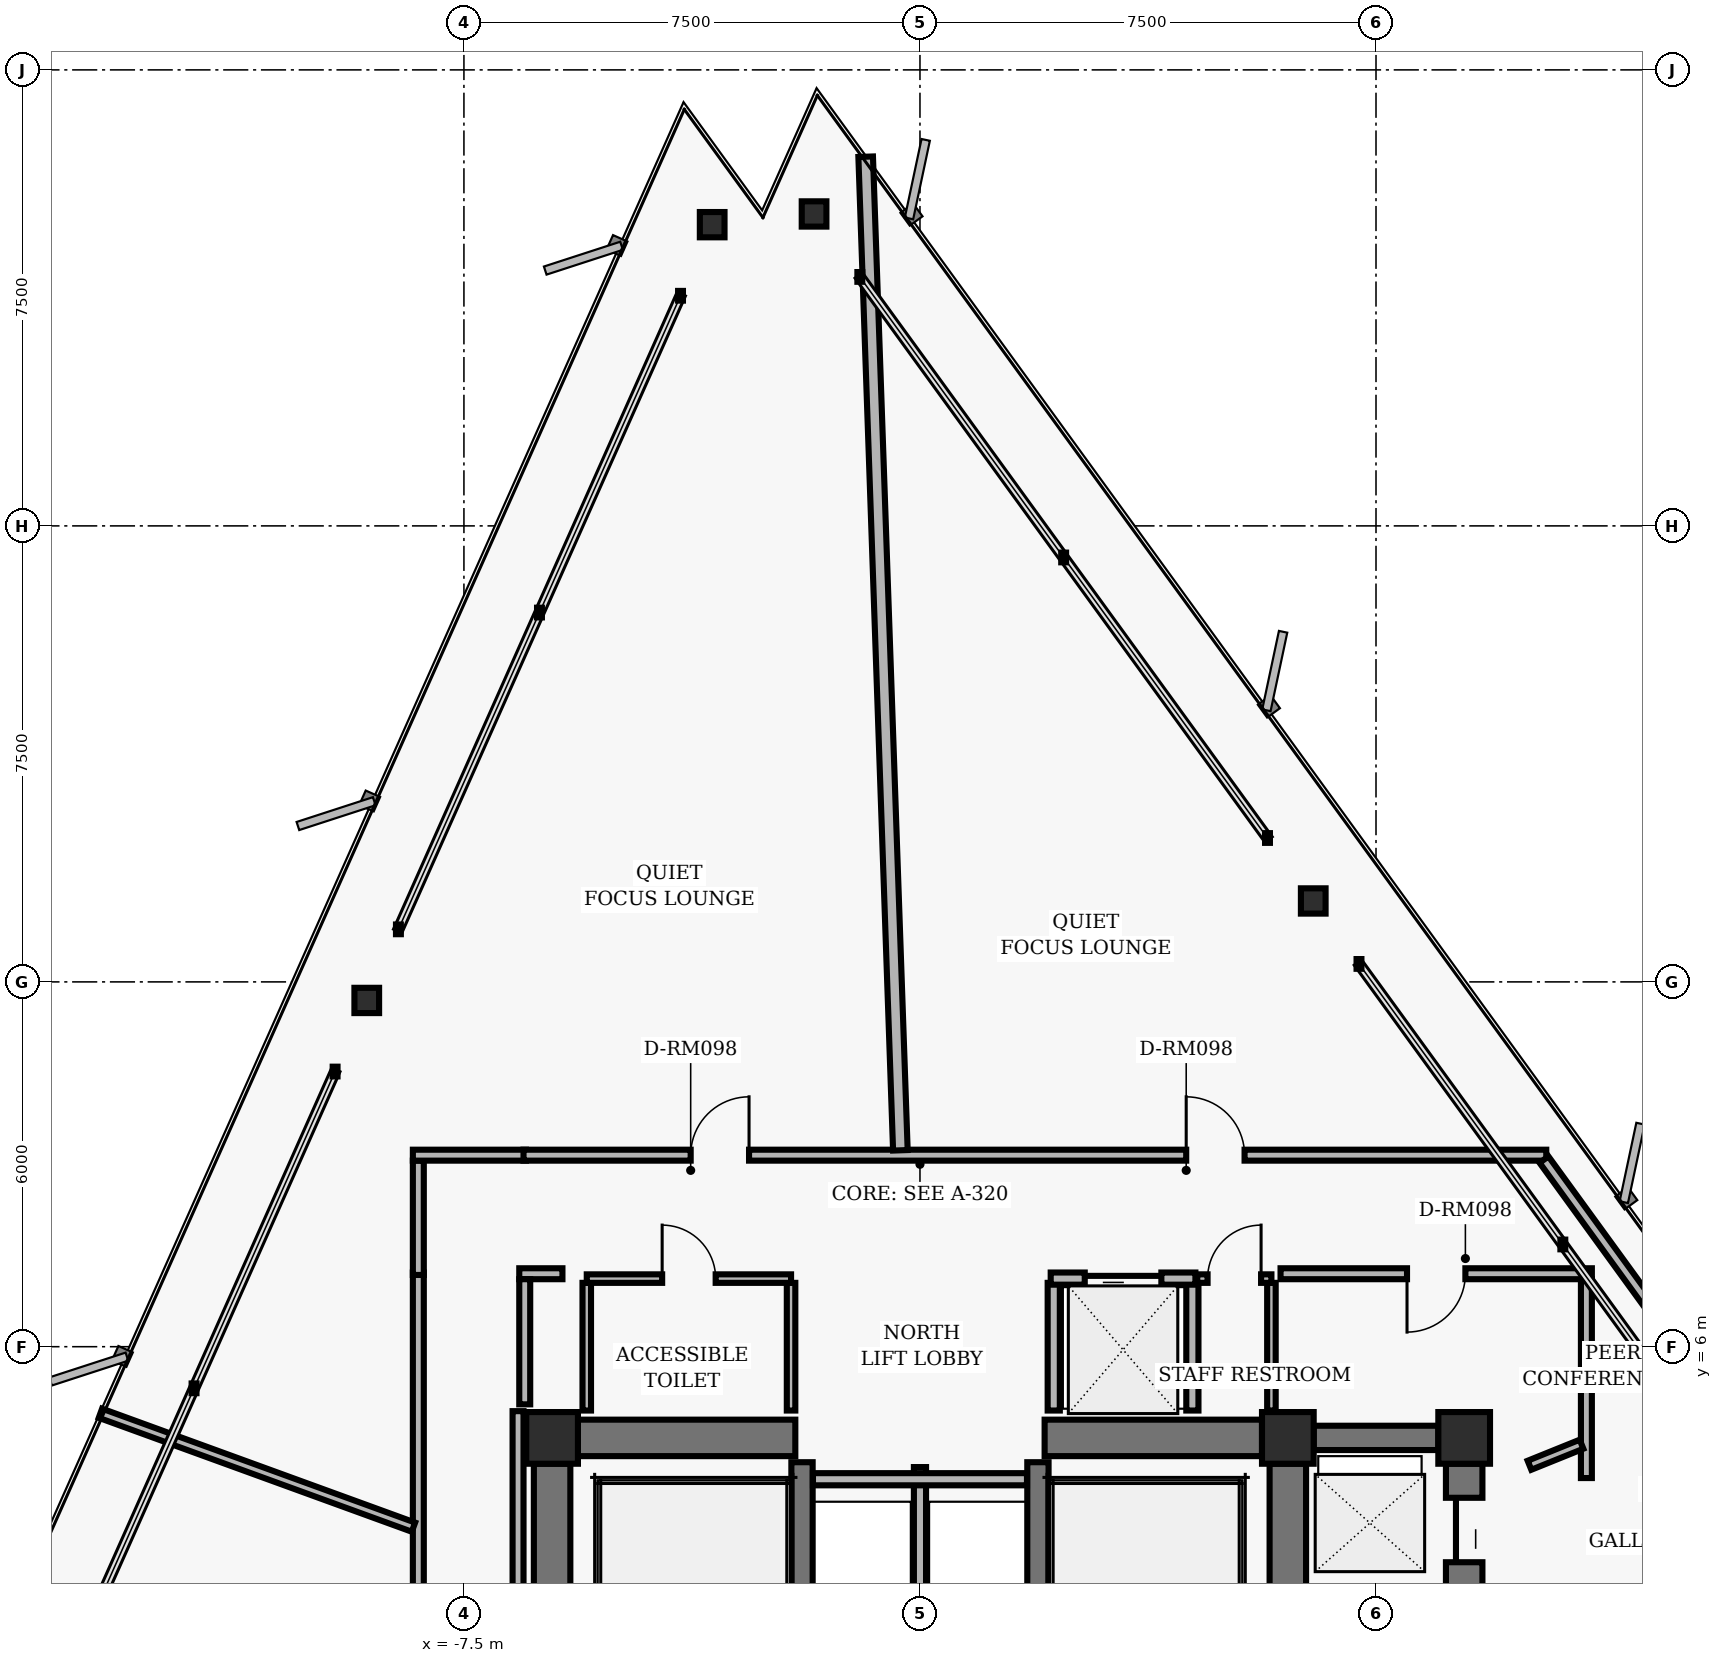
"""IFC4 building model, lengths in metres.
Left out: names, types, materials, properties, quantities, classifications, styles, units other than length and angle.
Written with IfcOpenShell. Run it as: python <this file> out.ifc"""

import sys

from ifc_helpers import new_model, si_unit, direction, frame, frame_2d, origin, origin_2d, place, context, subcontext, project, spatial, rectangle, hollow_rectangle, i_section, extrude, element, fill, save


model = new_model("IFC4")
c1 = context("Model", 3, precision=1e-05, world=origin(), true_north=direction((0.0, 1.0)))
c2 = subcontext(c1, "Body", "Model", "MODEL_VIEW")
j1 = project(units=[si_unit("LENGTHUNIT", "METRE"), si_unit("PLANEANGLEUNIT", "RADIAN")], contexts=[c1])
p1 = place(None, origin())
s1 = spatial("IfcSite", under=j1, at=p1, CompositionType="ELEMENT")
p2 = place(p1, origin())
s2 = spatial("IfcBuilding", under=s1, at=p2, CompositionType="ELEMENT")
p3 = place(p2, frame((0.0, 0.0, 122.88)))
s3 = spatial("IfcBuildingStorey", under=s2, at=p3, CompositionType="ELEMENT", Elevation=122.88)
for number, where, z_axis, x_axis in (
    (1, (-6.05, 4.5, 0.0), (0.0, 0.0, 1.0), (1.0, 0.0, 0.0)),
    (2, (6.05, 4.5, 0.0), (0.0, 0.0, 1.0), (1.0, 0.0, 0.0)),
    (3, (8.95, 4.5, 0.0), (0.0, 0.0, 1.0), (1.0, 0.0, 0.0)),
):
    element("IfcColumn", number, at=place(p3, frame(where, z_axis=z_axis, x_axis=x_axis)), inside=s3, PredefinedType="COLUMN", context=c2, shape_type="SweptSolid", body=[
        extrude(hollow_rectangle(XDim=0.85, YDim=0.85, WallThickness=0.055, InnerFilletRadius=0.02, OuterFilletRadius=0.04, at=origin_2d()), origin(), (0.0, 0.0, 1.0), 3.04),
    ])
for number, where, z_axis, x_axis in (
    (4, (-6.05, 0.425, 0.0), (0.0, 0.0, 1.0), (0.0, 1.0, 0.0)),
    (5, (6.05, 0.425, 0.0), (0.0, 0.0, 1.0), (0.0, 1.0, 0.0)),
):
    element("IfcWall", number, at=place(p3, frame(where, z_axis=z_axis, x_axis=x_axis)), inside=s3, PredefinedType="SHEAR", context=c2, shape_type="SweptSolid", body=[
        extrude(rectangle(XDim=3.65, YDim=0.6, at=frame_2d((1.825, 0.0))), origin(), (0.0, 0.0, 1.0), 2.618),
    ])
for number, where, z_axis, x_axis in (
    (6, (-1.94, -4.1, 0.0), (0.0, 0.0, 1.0), (0.0, 1.0, 0.0)),
    (7, (1.94, -4.1, 0.0), (0.0, 0.0, 1.0), (0.0, 1.0, 0.0)),
):
    element("IfcWall", number, at=place(p3, frame(where, z_axis=z_axis, x_axis=x_axis)), inside=s3, PredefinedType="SHEAR", context=c2, shape_type="SweptSolid", body=[
        extrude(rectangle(XDim=8.2, YDim=0.35, at=frame_2d((4.1, 0.0))), origin(), (0.0, 0.0, 1.0), 2.618),
    ])
for number, where, z_axis, x_axis in (
    (8, (-5.625, 4.5, 0.0), (0.0, 0.0, 1.0), (1.0, 0.0, 0.0)),
    (9, (2.05, 4.5, 0.0), (0.0, 0.0, 1.0), (1.0, 0.0, 0.0)),
):
    element("IfcWall", number, at=place(p3, frame(where, z_axis=z_axis, x_axis=x_axis)), inside=s3, PredefinedType="SHEAR", context=c2, shape_type="SweptSolid", body=[
        extrude(rectangle(XDim=3.575, YDim=0.6, at=frame_2d((1.788, 0.0))), origin(), (0.0, 0.0, 1.0), 2.618),
    ])
p4 = place(p3, frame((8.95, -3.875, 0.0), z_axis=(0.0, 0.0, 1.0), x_axis=(0.0, 1.0, 0.0)))
e10 = element("IfcWall", 10, at=p4, inside=s3, PredefinedType="SHEAR", context=c2, shape_type="SweptSolid", body=[
    extrude(rectangle(XDim=7.95, YDim=0.6, at=frame_2d((3.975, 0.0))), origin(), (0.0, 0.0, 1.0), 2.618),
])
p5 = place(p4, frame((0.55, 0.0, 0.0)))
e11 = element("IfcOpeningElement", 11, at=p5, cuts=e10, PredefinedType="OPENING", context=c2, shape_type="SweptSolid", body=[
    extrude(rectangle(XDim=1.06, YDim=2.04, at=frame_2d((0.53, 1.02))), frame((0.0, 0.31, 0.0), z_axis=(0.0, -1.0, 0.0), x_axis=(1.0, 0.0, 0.0)), (0.0, 0.0, 1.0), 0.62),
])
p6 = place(p4, frame((3.445, 0.0, 0.0)))
e12 = element("IfcOpeningElement", 12, at=p6, cuts=e10, PredefinedType="OPENING", context=c2, shape_type="SweptSolid", body=[
    extrude(rectangle(XDim=1.06, YDim=2.04, at=frame_2d((0.53, 1.02))), frame((0.0, 0.31, 0.0), z_axis=(0.0, -1.0, 0.0), x_axis=(1.0, 0.0, 0.0)), (0.0, 0.0, 1.0), 0.62),
])
p7 = place(p4, frame((6.33, 0.0, 0.0)))
e13 = element("IfcOpeningElement", 13, at=p7, cuts=e10, PredefinedType="OPENING", context=c2, shape_type="SweptSolid", body=[
    extrude(rectangle(XDim=1.06, YDim=2.04, at=frame_2d((0.53, 1.02))), frame((0.0, 0.31, 0.0), z_axis=(0.0, -1.0, 0.0), x_axis=(1.0, 0.0, 0.0)), (0.0, 0.0, 1.0), 0.62),
])
p8 = place(p3, frame((6.475, 4.5, 0.0), z_axis=(0.0, 0.0, 1.0), x_axis=(1.0, 0.0, 0.0)))
e14 = element("IfcWall", 14, at=p8, inside=s3, PredefinedType="SHEAR", context=c2, shape_type="SweptSolid", body=[
    extrude(rectangle(XDim=2.05, YDim=0.4, at=frame_2d((1.025, 0.0))), origin(), (0.0, 0.0, 1.0), 2.618),
])
for number, where, z_axis, x_axis in (
    (15, (6.468, 13.331, 0.0), (0.0, 0.0, 1.0), (1.0, 0.0, 0.0)),
    (16, (-1.742, 24.63, 0.0), (0.0, 0.0, 1.0), (1.0, 0.0, 0.0)),
    (17, (-3.417, 24.454, 0.0), (0.0, 0.0, 1.0), (1.0, 0.0, 0.0)),
    (18, (-9.098, 11.695, 0.0), (0.0, 0.0, 1.0), (1.0, 0.0, 0.0)),
):
    element("IfcColumn", number, at=place(p3, frame(where, z_axis=z_axis, x_axis=x_axis)), inside=s3, PredefinedType="COLUMN", context=c2, shape_type="SweptSolid", body=[
        extrude(i_section(OverallWidth=0.406, OverallDepth=0.416, WebThickness=0.03, FlangeThickness=0.048, FilletRadius=0.02, at=origin_2d()), origin(), (0.0, 0.0, 1.0), 3.04),
    ])
p9 = place(p3, frame((0.0, 1.25, 0.0), z_axis=(0.0, 0.0, 1.0), x_axis=(0.0, 1.0, 0.0)))
e19 = element("IfcWall", 19, at=p9, inside=s3, PredefinedType="PARTITIONING", context=c2, shape_type="SweptSolid", body=[
    extrude(rectangle(XDim=2.77, YDim=0.2, at=frame_2d((1.385, 0.0))), origin(), (0.0, 0.0, 1.0), 2.593),
])
p10 = place(p3, frame((-1.76, 3.82, 0.0), z_axis=(0.0, 0.0, 1.0), x_axis=(1.0, 0.0, 0.0)))
e20 = element("IfcWall", 20, at=p10, inside=s3, PredefinedType="PARTITIONING", context=c2, shape_type="SweptSolid", body=[
    extrude(rectangle(XDim=3.52, YDim=0.2, at=frame_2d((1.76, 0.0))), origin(), (0.0, 0.0, 1.0), 2.593),
])
p11 = place(p3, frame((2.2, 4.95, 0.0), z_axis=(0.0, 0.0, 1.0), x_axis=(0.0, 1.0, 0.0)))
e21 = element("IfcWall", 21, at=p11, inside=s3, PredefinedType="PARTITIONING", context=c2, shape_type="SweptSolid", body=[
    extrude(rectangle(XDim=2.1, YDim=0.2, at=frame_2d((1.05, 0.0))), origin(), (0.0, 0.0, 1.0), 1.962),
])
p12 = place(p3, frame((4.48, 4.95, 0.0), z_axis=(0.0, 0.0, 1.0), x_axis=(0.0, 1.0, 0.0)))
e22 = element("IfcWall", 22, at=p12, inside=s3, PredefinedType="PARTITIONING", context=c2, shape_type="SweptSolid", body=[
    extrude(rectangle(XDim=2.1, YDim=0.2, at=frame_2d((1.05, 0.0))), origin(), (0.0, 0.0, 1.0), 2.593),
])
p13 = place(p3, frame((2.15, 7.12, 0.0), z_axis=(0.0, 0.0, 1.0), x_axis=(1.0, 0.0, 0.0)))
e23 = element("IfcWall", 23, at=p13, inside=s3, PredefinedType="PARTITIONING", context=c2, shape_type="SweptSolid", body=[
    extrude(rectangle(XDim=2.38, YDim=0.2, at=frame_2d((1.19, 0.0))), origin(), (0.0, 0.0, 1.0), 2.593),
])
p14 = place(p13, frame((0.56, 0.0, 0.0)))
e24 = element("IfcOpeningElement", 24, at=p14, cuts=e23, PredefinedType="OPENING", context=c2, shape_type="SweptSolid", body=[
    extrude(rectangle(XDim=1.26, YDim=2.06, at=frame_2d((0.63, 1.03))), frame((0.0, 0.11, 0.0), z_axis=(0.0, -1.0, 0.0), x_axis=(1.0, 0.0, 0.0)), (0.0, 0.0, 1.0), 0.22),
])
for number, where, z_axis, x_axis in (
    (25, (-5.48, 4.95, 0.0), (0.0, 0.0, 1.0), (0.0, 1.0, 0.0)),
    (26, (-2.12, 4.95, 0.0), (0.0, 0.0, 1.0), (0.0, 1.0, 0.0)),
):
    element("IfcWall", number, at=place(p3, frame(where, z_axis=z_axis, x_axis=x_axis)), inside=s3, PredefinedType="PARTITIONING", context=c2, shape_type="SweptSolid", body=[
        extrude(rectangle(XDim=2.1, YDim=0.14, at=frame_2d((1.05, 0.0))), origin(), (0.0, 0.0, 1.0), 2.593),
    ])
p15 = place(p3, frame((-5.48, 7.12, 0.0), z_axis=(0.0, 0.0, 1.0), x_axis=(1.0, 0.0, 0.0)))
e27 = element("IfcWall", 27, at=p15, inside=s3, PredefinedType="PARTITIONING", context=c2, shape_type="SweptSolid", body=[
    extrude(rectangle(XDim=3.36, YDim=0.14, at=frame_2d((1.68, 0.0))), origin(), (0.0, 0.0, 1.0), 2.593),
])
p16 = place(p15, frame((1.24, 0.0, 0.0)))
e28 = element("IfcOpeningElement", 28, at=p16, cuts=e27, PredefinedType="OPENING", context=c2, shape_type="SweptSolid", body=[
    extrude(rectangle(XDim=0.88, YDim=2.02, at=frame_2d((0.44, 1.01))), frame((0.0, 0.08, 0.0), z_axis=(0.0, -1.0, 0.0), x_axis=(1.0, 0.0, 0.0)), (0.0, 0.0, 1.0), 0.16),
])
p17 = place(p3, frame((5.78, 4.95, 0.0), z_axis=(0.0, 0.0, 1.0), x_axis=(0.0, 1.0, 0.0)))
e29 = element("IfcWall", 29, at=p17, inside=s3, PredefinedType="PARTITIONING", context=c2, shape_type="SweptSolid", body=[
    extrude(rectangle(XDim=2.1, YDim=0.14, at=frame_2d((1.05, 0.0))), origin(), (0.0, 0.0, 1.0), 1.962),
])
p18 = place(p3, frame((4.56, 7.12, 0.0), z_axis=(0.0, 0.0, 1.0), x_axis=(1.0, 0.0, 0.0)))
e30 = element("IfcWall", 30, at=p18, inside=s3, PredefinedType="PARTITIONING", context=c2, shape_type="SweptSolid", body=[
    extrude(rectangle(XDim=1.22, YDim=0.14, at=frame_2d((0.61, 0.0))), origin(), (0.0, 0.0, 1.0), 2.593),
])
p19 = place(p18, frame((0.17, 0.0, 0.0)))
e31 = element("IfcOpeningElement", 31, at=p19, cuts=e30, PredefinedType="OPENING", context=c2, shape_type="SweptSolid", body=[
    extrude(rectangle(XDim=0.88, YDim=2.02, at=frame_2d((0.44, 1.01))), frame((0.0, 0.08, 0.0), z_axis=(0.0, -1.0, 0.0), x_axis=(1.0, 0.0, 0.0)), (0.0, 0.0, 1.0), 0.16),
])
p20 = place(p3, frame((-8.25, -7.22, 0.0), z_axis=(0.0, 0.0, 1.0), x_axis=(0.0, 1.0, 0.0)))
e32 = element("IfcWall", 32, at=p20, inside=s3, PredefinedType="PARTITIONING", context=c2, shape_type="SweptSolid", body=[
    extrude(rectangle(XDim=14.44, YDim=0.18, at=frame_2d((7.22, 0.0))), origin(), (0.0, 0.0, 1.0), 2.16),
])
p21 = place(p20, frame((4.775, 0.0, 0.0)))
e33 = element("IfcOpeningElement", 33, at=p21, cuts=e32, PredefinedType="OPENING", context=c2, shape_type="SweptSolid", body=[
    extrude(rectangle(XDim=0.96, YDim=2.02, at=frame_2d((0.48, 1.01))), frame((0.0, 0.1, 0.0), z_axis=(0.0, -1.0, 0.0), x_axis=(1.0, 0.0, 0.0)), (0.0, 0.0, 1.0), 0.2),
])
p22 = place(p3, frame((-8.25, 7.18, 0.0), z_axis=(0.0, 0.0, 1.0), x_axis=(0.0, 1.0, 0.0)))
e34 = element("IfcWall", 34, at=p22, inside=s3, PredefinedType="PARTITIONING", context=c2, shape_type="SweptSolid", body=[
    extrude(rectangle(XDim=1.88, YDim=0.18, at=frame_2d((0.94, 0.0))), origin(), (0.0, 0.0, 1.0), 2.593),
])
p23 = place(p3, frame((-8.34, 9.15, 0.0), z_axis=(0.0, 0.0, 1.0), x_axis=(1.0, 0.0, 0.0)))
e35 = element("IfcWall", 35, at=p23, inside=s3, PredefinedType="PARTITIONING", context=c2, shape_type="SweptSolid", body=[
    extrude(rectangle(XDim=1.86, YDim=0.18, at=frame_2d((0.93, 0.0))), origin(), (0.0, 0.0, 1.0), 2.593),
])
p24 = place(p3, frame((-6.52, 9.15, 0.0), z_axis=(0.0, 0.0, 1.0), x_axis=(1.0, 0.0, 0.0)))
e36 = element("IfcWall", 36, at=p24, inside=s3, PredefinedType="PARTITIONING", context=c2, shape_type="SweptSolid", body=[
    extrude(rectangle(XDim=16.82, YDim=0.18, at=frame_2d((8.41, 0.0))), origin(), (0.0, 0.0, 1.0), 2.593),
])
p25 = place(p24, frame((10.898, 0.0, 0.0)))
e37 = element("IfcOpeningElement", 37, at=p25, cuts=e36, PredefinedType="OPENING", context=c2, shape_type="SweptSolid", body=[
    extrude(rectangle(XDim=0.96, YDim=2.02, at=frame_2d((0.48, 1.01))), frame((0.0, 0.1, 0.0), z_axis=(0.0, -1.0, 0.0), x_axis=(1.0, 0.0, 0.0)), (0.0, 0.0, 1.0), 0.2),
])
p26 = place(p24, frame((2.749, 0.0, 0.0)))
e38 = element("IfcOpeningElement", 38, at=p26, cuts=e36, PredefinedType="OPENING", context=c2, shape_type="SweptSolid", body=[
    extrude(rectangle(XDim=0.96, YDim=2.02, at=frame_2d((0.48, 1.01))), frame((0.0, 0.1, 0.0), z_axis=(0.0, -1.0, 0.0), x_axis=(1.0, 0.0, 0.0)), (0.0, 0.0, 1.0), 0.2),
])
p27 = place(p3, frame((10.263, 9.077, 0.0), z_axis=(0.0, 0.0, 1.0), x_axis=(0.587780951295, -0.809020119215, 0.0)))
e39 = element("IfcWall", 39, at=p27, inside=s3, PredefinedType="PARTITIONING", context=c2, shape_type="SweptSolid", body=[
    extrude(rectangle(XDim=7.469, YDim=0.18, at=frame_2d((3.734, 0.0))), origin(), (0.0, 0.0, 1.0), 2.593),
])
p28 = place(p3, frame((10.96, 3.84, 0.0), z_axis=(0.0, 0.0, 1.0), x_axis=(0.0, 1.0, 0.0)))
e40 = element("IfcWall", 40, at=p28, inside=s3, PredefinedType="PARTITIONING", context=c2, shape_type="SweptSolid", body=[
    extrude(rectangle(XDim=3.271, YDim=0.18, at=frame_2d((1.635, 0.0))), origin(), (0.0, 0.0, 1.0), 2.593),
])
p29 = place(p3, frame((11.05, 7.2, 0.0), z_axis=(0.0, 0.0, 1.0), x_axis=(-1.0, 0.0, 0.0)))
e41 = element("IfcWall", 41, at=p29, inside=s3, PredefinedType="PARTITIONING", context=c2, shape_type="SweptSolid", body=[
    extrude(rectangle(XDim=5.12, YDim=0.18, at=frame_2d((2.56, 0.0))), origin(), (0.0, 0.0, 1.0), 2.593),
])
p30 = place(p29, frame((2.08, 0.0, 0.0)))
e42 = element("IfcOpeningElement", 42, at=p30, cuts=e41, PredefinedType="OPENING", context=c2, shape_type="SweptSolid", body=[
    extrude(rectangle(XDim=0.96, YDim=2.02, at=frame_2d((0.48, 1.01))), frame((0.0, 0.1, 0.0), z_axis=(0.0, -1.0, 0.0), x_axis=(1.0, 0.0, 0.0)), (0.0, 0.0, 1.0), 0.2),
])
p31 = place(p3, frame((-5.88, 7.2, 0.0), z_axis=(0.0, 0.0, 1.0), x_axis=(-1.0, 0.0, 0.0)))
e43 = element("IfcWall", 43, at=p31, inside=s3, PredefinedType="PARTITIONING", context=c2, shape_type="SweptSolid", body=[
    extrude(rectangle(XDim=0.71, YDim=0.18, at=frame_2d((0.355, 0.0))), origin(), (0.0, 0.0, 1.0), 2.593),
])
p32 = place(p3, frame((-6.5, 7.11, 0.0), z_axis=(0.0, 0.0, 1.0), x_axis=(0.0, -1.0, 0.0)))
e44 = element("IfcWall", 44, at=p32, inside=s3, PredefinedType="PARTITIONING", context=c2, shape_type="SweptSolid", body=[
    extrude(rectangle(XDim=2.058, YDim=0.18, at=frame_2d((1.029, 0.0))), origin(), (0.0, 0.0, 1.0), 2.593),
])
p33 = place(p3, frame((-6.61, 4.94, 0.0), z_axis=(0.0, 0.0, 1.0), x_axis=(0.0, -1.0, 0.0)))
e45 = element("IfcWall", 45, at=p33, inside=s3, PredefinedType="PARTITIONING", context=c2, shape_type="SweptSolid", body=[
    extrude(rectangle(XDim=9.46, YDim=0.18, at=frame_2d((4.73, 0.0))), origin(), (0.0, 0.0, 1.0), 2.593),
])
p34 = place(p3, frame((10.024, 4.05, 0.0), z_axis=(0.0, 0.0, 1.0), x_axis=(0.927194137639, 0.374581140912, 0.0)))
e46 = element("IfcWall", 46, at=p34, inside=s3, PredefinedType="PARTITIONING", context=c2, shape_type="SweptSolid", body=[
    extrude(rectangle(XDim=0.923, YDim=0.16, at=frame_2d((0.461, 0.0))), origin(), (0.0, 0.0, 1.0), 2.593),
])
p35 = place(p3, frame((-0.322, 9.23, 0.0), z_axis=(0.0, 0.0, 1.0), x_axis=(-0.034907078812, 0.999390562217, 0.0)))
e47 = element("IfcWall", 47, at=p35, inside=s3, PredefinedType="PARTITIONING", context=c2, shape_type="SweptSolid", body=[
    extrude(rectangle(XDim=16.352, YDim=0.24, at=frame_2d((8.176, 0.0))), origin(), (0.0, 0.0, 1.0), 1.962),
])
p36 = place(p3, frame((-8.33, 3.032, 0.0), z_axis=(0.0, 0.0, 1.0), x_axis=(-0.939693198397, 0.342018556347, 0.0)))
e48 = element("IfcWall", 48, at=p36, inside=s3, PredefinedType="PARTITIONING", context=c2, shape_type="SweptSolid", body=[
    extrude(rectangle(XDim=5.479, YDim=0.16, at=frame_2d((2.739, 0.0))), origin(), (0.0, 0.0, 1.0), 2.593),
])
p37 = place(p14, origin())
e49 = element("IfcDoor", 49, at=p37, inside=s3, OperationType="SLIDING_TO_LEFT", PredefinedType="DOOR", context=c2, shape_type="SweptSolid", body=[
    extrude(rectangle(XDim=1.26, YDim=2.06, at=frame_2d((0.63, 1.03))), frame((0.0, 0.025, 0.0), z_axis=(0.0, -1.0, 0.0), x_axis=(1.0, 0.0, 0.0)), (0.0, 0.0, 1.0), 0.05),
])
fill(e24, e49)
p38 = place(p16, origin())
e50 = element("IfcDoor", 50, at=p38, inside=s3, OperationType="SINGLE_SWING_LEFT", PredefinedType="DOOR", context=c2, shape_type="SweptSolid", body=[
    extrude(rectangle(XDim=0.88, YDim=2.02, at=frame_2d((0.44, 1.01))), frame((0.0, 0.025, 0.0), z_axis=(0.0, -1.0, 0.0), x_axis=(1.0, 0.0, 0.0)), (0.0, 0.0, 1.0), 0.05),
])
fill(e28, e50)
p39 = place(p19, origin())
e51 = element("IfcDoor", 51, at=p39, inside=s3, OperationType="SINGLE_SWING_RIGHT", PredefinedType="DOOR", context=c2, shape_type="SweptSolid", body=[
    extrude(rectangle(XDim=0.88, YDim=2.02, at=frame_2d((0.44, 1.01))), frame((0.0, 0.025, 0.0), z_axis=(0.0, -1.0, 0.0), x_axis=(1.0, 0.0, 0.0)), (0.0, 0.0, 1.0), 0.05),
])
fill(e31, e51)
p40 = place(p7, origin())
e52 = element("IfcDoor", 52, at=p40, inside=s3, OperationType="SLIDING_TO_LEFT", PredefinedType="DOOR", context=c2, shape_type="SweptSolid", body=[
    extrude(rectangle(XDim=1.06, YDim=2.04, at=frame_2d((0.53, 1.02))), frame((0.0, 0.025, 0.0), z_axis=(0.0, -1.0, 0.0), x_axis=(1.0, 0.0, 0.0)), (0.0, 0.0, 1.0), 0.05),
])
fill(e13, e52)
p41 = place(p30, origin())
e53 = element("IfcDoor", 53, at=p41, inside=s3, OperationType="SINGLE_SWING_RIGHT", PredefinedType="DOOR", context=c2, shape_type="SweptSolid", body=[
    extrude(rectangle(XDim=0.96, YDim=2.02, at=frame_2d((0.48, 1.01))), frame((0.0, 0.025, 0.0), z_axis=(0.0, -1.0, 0.0), x_axis=(1.0, 0.0, 0.0)), (0.0, 0.0, 1.0), 0.05),
])
fill(e42, e53)
p42 = place(p25, origin())
e54 = element("IfcDoor", 54, at=p42, inside=s3, OperationType="SINGLE_SWING_LEFT", PredefinedType="DOOR", context=c2, shape_type="SweptSolid", body=[
    extrude(rectangle(XDim=0.96, YDim=2.02, at=frame_2d((0.48, 1.01))), frame((0.0, 0.025, 0.0), z_axis=(0.0, -1.0, 0.0), x_axis=(1.0, 0.0, 0.0)), (0.0, 0.0, 1.0), 0.05),
])
fill(e37, e54)
p43 = place(p26, origin())
e55 = element("IfcDoor", 55, at=p43, inside=s3, OperationType="SINGLE_SWING_RIGHT", PredefinedType="DOOR", context=c2, shape_type="SweptSolid", body=[
    extrude(rectangle(XDim=0.96, YDim=2.02, at=frame_2d((0.48, 1.01))), frame((0.0, 0.025, 0.0), z_axis=(0.0, -1.0, 0.0), x_axis=(1.0, 0.0, 0.0)), (0.0, 0.0, 1.0), 0.05),
])
fill(e38, e55)
save(model, sys.argv[1])
